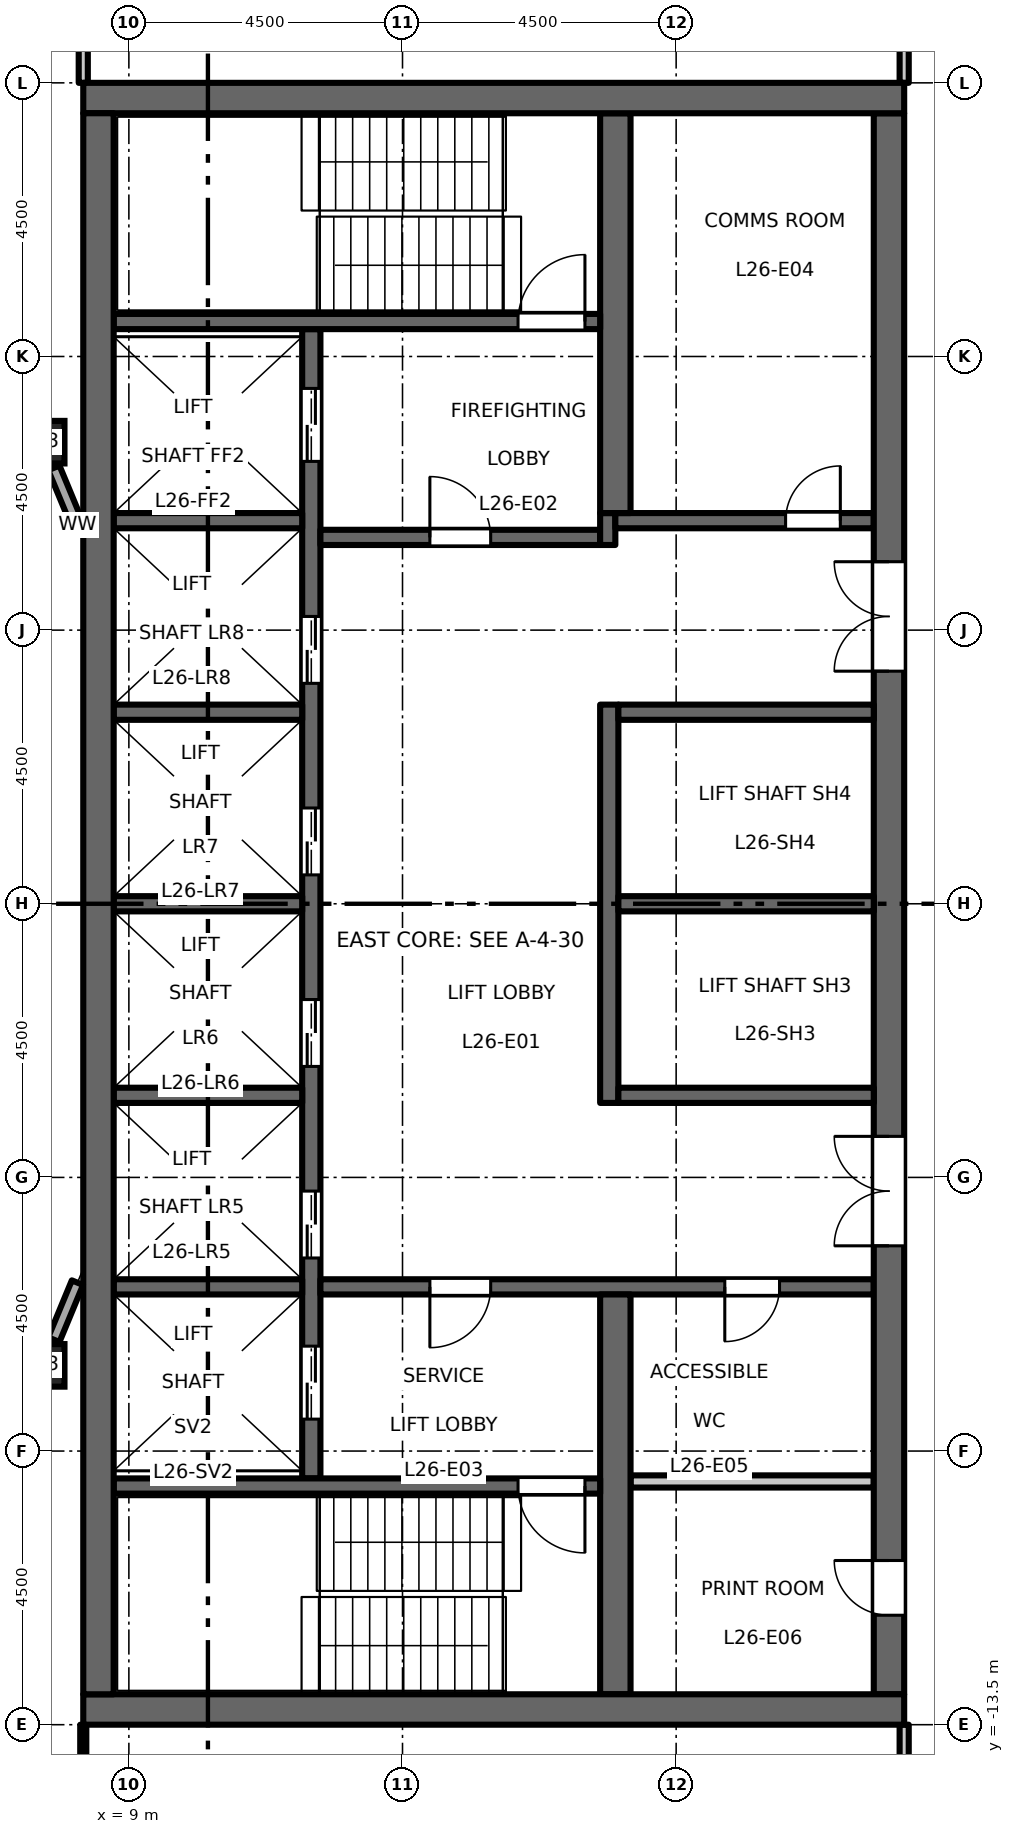
"""IFC4 building model, lengths in metres.
Left out: names, types, materials, properties, quantities, classifications, styles, units other than length and angle.
Written with IfcOpenShell. Run it as: python <this file> out.ifc"""

import sys

from ifc_helpers import new_model, si_unit, direction, frame, frame_2d, origin, origin_2d, place, context, subcontext, project, spatial, rectangle, hollow_rectangle, extrude, element, fill, save


model = new_model("IFC4")
c1 = context("Model", 3, precision=1e-05, world=origin(), true_north=direction((0.0, 1.0)))
c2 = subcontext(c1, "Body", "Model", "MODEL_VIEW")
j1 = project(units=[si_unit("LENGTHUNIT", "METRE"), si_unit("PLANEANGLEUNIT", "RADIAN")], contexts=[c1])
p1 = place(None, origin())
s1 = spatial("IfcSite", under=j1, at=p1, CompositionType="ELEMENT")
p2 = place(p1, origin())
s2 = spatial("IfcBuilding", under=s1, at=p2, CompositionType="ELEMENT")
p3 = place(p2, frame((0.0, 0.0, 122.7)))
s3 = spatial("IfcBuildingStorey", under=s2, at=p3, CompositionType="ELEMENT", Elevation=122.7)
for number, where, z_axis, x_axis in (
    (1, (7.591, -7.591, 0.0), (0.0, 0.0, 1.0), (1.0, 0.0, 0.0)),
    (2, (7.591, 7.591, 0.0), (0.0, 0.0, 1.0), (1.0, 0.0, 0.0)),
):
    element("IfcColumn", number, at=place(p3, frame(where, z_axis=z_axis, x_axis=x_axis)), inside=s3, PredefinedType="COLUMN", context=c2, shape_type="SweptSolid", body=[
        extrude(hollow_rectangle(XDim=0.7, YDim=0.7, WallThickness=0.04, at=origin_2d()), origin(), (0.0, 0.0, 1.0), 4.5),
    ])
p4 = place(p3, frame((12.0, -9.45, 0.0), z_axis=(0.0, 0.0, 1.0), x_axis=(0.0, 1.0, 0.0)))
e3 = element("IfcWall", 3, at=p4, inside=s3, PredefinedType="SHEAR", context=c2, shape_type="SweptSolid", body=[
    extrude(rectangle(XDim=18.9, YDim=0.3, at=frame_2d((9.45, 0.0))), origin(), (0.0, 0.0, 1.0), 4.35),
])
p5 = place(p4, frame((3.625, 0.0, 0.0)))
e4 = element("IfcOpeningElement", 4, at=p5, cuts=e3, PredefinedType="OPENING", context=c2, shape_type="SweptSolid", body=[
    extrude(rectangle(XDim=1.1, YDim=2.1, at=frame_2d((0.55, 1.05))), frame((0.0, 0.16, 0.0), z_axis=(0.0, -1.0, 0.0), x_axis=(1.0, 0.0, 0.0)), (0.0, 0.0, 1.0), 0.32),
])
p6 = place(p4, frame((6.775, 0.0, 0.0)))
e5 = element("IfcOpeningElement", 5, at=p6, cuts=e3, PredefinedType="OPENING", context=c2, shape_type="SweptSolid", body=[
    extrude(rectangle(XDim=1.1, YDim=2.1, at=frame_2d((0.55, 1.05))), frame((0.0, 0.16, 0.0), z_axis=(0.0, -1.0, 0.0), x_axis=(1.0, 0.0, 0.0)), (0.0, 0.0, 1.0), 0.32),
])
p7 = place(p4, frame((9.925, 0.0, 0.0)))
e6 = element("IfcOpeningElement", 6, at=p7, cuts=e3, PredefinedType="OPENING", context=c2, shape_type="SweptSolid", body=[
    extrude(rectangle(XDim=1.1, YDim=2.1, at=frame_2d((0.55, 1.05))), frame((0.0, 0.16, 0.0), z_axis=(0.0, -1.0, 0.0), x_axis=(1.0, 0.0, 0.0)), (0.0, 0.0, 1.0), 0.32),
])
p8 = place(p4, frame((13.075, 0.0, 0.0)))
e7 = element("IfcOpeningElement", 7, at=p8, cuts=e3, PredefinedType="OPENING", context=c2, shape_type="SweptSolid", body=[
    extrude(rectangle(XDim=1.1, YDim=2.1, at=frame_2d((0.55, 1.05))), frame((0.0, 0.16, 0.0), z_axis=(0.0, -1.0, 0.0), x_axis=(1.0, 0.0, 0.0)), (0.0, 0.0, 1.0), 0.32),
])
p9 = place(p4, frame((16.725, 0.0, 0.0)))
e8 = element("IfcOpeningElement", 8, at=p9, cuts=e3, PredefinedType="OPENING", context=c2, shape_type="SweptSolid", body=[
    extrude(rectangle(XDim=1.2, YDim=2.1, at=frame_2d((0.6, 1.05))), frame((0.0, 0.16, 0.0), z_axis=(0.0, -1.0, 0.0), x_axis=(1.0, 0.0, 0.0)), (0.0, 0.0, 1.0), 0.32),
])
p10 = place(p4, frame((0.975, 0.0, 0.0)))
e9 = element("IfcOpeningElement", 9, at=p10, cuts=e3, PredefinedType="OPENING", context=c2, shape_type="SweptSolid", body=[
    extrude(rectangle(XDim=1.2, YDim=2.1, at=frame_2d((0.6, 1.05))), frame((0.0, 0.16, 0.0), z_axis=(0.0, -1.0, 0.0), x_axis=(1.0, 0.0, 0.0)), (0.0, 0.0, 1.0), 0.32),
])
p11 = place(p3, frame((12.15, 6.025, 0.0), z_axis=(0.0, 0.0, 1.0), x_axis=(1.0, 0.0, 0.0)))
e10 = element("IfcWall", 10, at=p11, inside=s3, PredefinedType="SHEAR", context=c2, shape_type="SweptSolid", body=[
    extrude(rectangle(XDim=4.6, YDim=0.25, at=frame_2d((2.3, 0.0))), origin(), (0.0, 0.0, 1.0), 4.35),
])
p12 = place(p11, frame((1.8, 0.0, 0.0)))
e11 = element("IfcOpeningElement", 11, at=p12, cuts=e10, PredefinedType="OPENING", context=c2, shape_type="SweptSolid", body=[
    extrude(rectangle(XDim=1.0, YDim=2.1, at=frame_2d((0.5, 1.05))), frame((0.0, 0.135, 0.0), z_axis=(0.0, -1.0, 0.0), x_axis=(1.0, 0.0, 0.0)), (0.0, 0.0, 1.0), 0.27),
])
p13 = place(p3, frame((16.875, 5.9, 0.0), z_axis=(0.0, 0.0, 1.0), x_axis=(0.0, 1.0, 0.0)))
e12 = element("IfcWall", 12, at=p13, inside=s3, PredefinedType="SHEAR", context=c2, shape_type="SweptSolid", body=[
    extrude(rectangle(XDim=0.525, YDim=0.25, at=frame_2d((0.263, 0.0))), origin(), (0.0, 0.0, 1.0), 4.35),
])
p14 = place(p3, frame((17.0, 6.3, 0.0), z_axis=(0.0, 0.0, 1.0), x_axis=(1.0, 0.0, 0.0)))
e13 = element("IfcWall", 13, at=p14, inside=s3, PredefinedType="SHEAR", context=c2, shape_type="SweptSolid", body=[
    extrude(rectangle(XDim=4.25, YDim=0.25, at=frame_2d((2.125, 0.0))), origin(), (0.0, 0.0, 1.0), 4.35),
])
p15 = place(p14, frame((2.8, 0.0, 0.0)))
e14 = element("IfcOpeningElement", 14, at=p15, cuts=e13, PredefinedType="OPENING", context=c2, shape_type="SweptSolid", body=[
    extrude(rectangle(XDim=0.9, YDim=2.1, at=frame_2d((0.45, 1.05))), frame((0.0, 0.135, 0.0), z_axis=(0.0, -1.0, 0.0), x_axis=(1.0, 0.0, 0.0)), (0.0, 0.0, 1.0), 0.27),
])
p16 = place(p3, frame((12.15, -6.3, 0.0), z_axis=(0.0, 0.0, 1.0), x_axis=(1.0, 0.0, 0.0)))
e15 = element("IfcWall", 15, at=p16, inside=s3, PredefinedType="SHEAR", context=c2, shape_type="SweptSolid", body=[
    extrude(rectangle(XDim=9.1, YDim=0.25, at=frame_2d((4.55, 0.0))), origin(), (0.0, 0.0, 1.0), 4.35),
])
p17 = place(p16, frame((1.8, 0.0, 0.0)))
e16 = element("IfcOpeningElement", 16, at=p17, cuts=e15, PredefinedType="OPENING", context=c2, shape_type="SweptSolid", body=[
    extrude(rectangle(XDim=1.0, YDim=2.1, at=frame_2d((0.5, 1.05))), frame((0.0, 0.135, 0.0), z_axis=(0.0, -1.0, 0.0), x_axis=(1.0, 0.0, 0.0)), (0.0, 0.0, 1.0), 0.27),
])
p18 = place(p16, frame((6.65, 0.0, 0.0)))
e17 = element("IfcOpeningElement", 17, at=p18, cuts=e15, PredefinedType="OPENING", context=c2, shape_type="SweptSolid", body=[
    extrude(rectangle(XDim=0.9, YDim=2.1, at=frame_2d((0.45, 1.05))), frame((0.0, 0.135, 0.0), z_axis=(0.0, -1.0, 0.0), x_axis=(1.0, 0.0, 0.0)), (0.0, 0.0, 1.0), 0.27),
])
p19 = place(p3, frame((21.5, -13.0, 0.0), z_axis=(0.0, 0.0, 1.0), x_axis=(0.0, 1.0, 0.0)))
e18 = element("IfcWall", 18, at=p19, inside=s3, PredefinedType="SHEAR", context=c2, shape_type="SweptSolid", body=[
    extrude(rectangle(XDim=26.0, YDim=0.5, at=frame_2d((13.0, 0.0))), origin(), (0.0, 0.0, 1.0), 4.35),
])
p20 = place(p19, frame((16.825, 0.0, 0.0)))
e19 = element("IfcOpeningElement", 19, at=p20, cuts=e18, PredefinedType="OPENING", context=c2, shape_type="SweptSolid", body=[
    extrude(rectangle(XDim=1.8, YDim=2.1, at=frame_2d((0.9, 1.05))), frame((0.0, 0.26, 0.0), z_axis=(0.0, -1.0, 0.0), x_axis=(1.0, 0.0, 0.0)), (0.0, 0.0, 1.0), 0.52),
])
p21 = place(p19, frame((7.375, 0.0, 0.0)))
e20 = element("IfcOpeningElement", 20, at=p21, cuts=e18, PredefinedType="OPENING", context=c2, shape_type="SweptSolid", body=[
    extrude(rectangle(XDim=1.8, YDim=2.1, at=frame_2d((0.9, 1.05))), frame((0.0, 0.26, 0.0), z_axis=(0.0, -1.0, 0.0), x_axis=(1.0, 0.0, 0.0)), (0.0, 0.0, 1.0), 0.52),
])
p22 = place(p19, frame((1.3, 0.0, 0.0)))
e21 = element("IfcOpeningElement", 21, at=p22, cuts=e18, PredefinedType="OPENING", context=c2, shape_type="SweptSolid", body=[
    extrude(rectangle(XDim=0.9, YDim=2.1, at=frame_2d((0.45, 1.05))), frame((0.0, 0.26, 0.0), z_axis=(0.0, -1.0, 0.0), x_axis=(1.0, 0.0, 0.0)), (0.0, 0.0, 1.0), 0.52),
])
p23 = place(p3, frame((17.25, -9.5, 0.0), z_axis=(0.0, 0.0, 1.0), x_axis=(1.0, 0.0, 0.0)))
e22 = element("IfcWall", 22, at=p23, inside=s3, PredefinedType="PARTITIONING", context=c2, shape_type="SweptSolid", body=[
    extrude(rectangle(XDim=4.0, YDim=0.2, at=frame_2d((2.0, 0.0))), origin(), (0.0, 0.0, 1.0), 4.35),
])
p24 = place(p3, frame((16.9, -3.275, 0.0), z_axis=(0.0, 0.0, 1.0), x_axis=(0.0, 1.0, 0.0)))
e23 = element("IfcWall", 23, at=p24, inside=s3, PredefinedType="SHEAR", context=c2, shape_type="SweptSolid", body=[
    extrude(rectangle(XDim=6.55, YDim=0.3, at=frame_2d((3.275, 0.0))), origin(), (0.0, 0.0, 1.0), 4.35),
])
for number, where, z_axis, x_axis in (
    (24, (17.05, 0.0, 0.0), (0.0, 0.0, 1.0), (1.0, 0.0, 0.0)),
    (25, (17.05, 3.15, 0.0), (0.0, 0.0, 1.0), (1.0, 0.0, 0.0)),
    (26, (17.05, -3.15, 0.0), (0.0, 0.0, 1.0), (1.0, 0.0, 0.0)),
):
    element("IfcWall", number, at=place(p3, frame(where, z_axis=z_axis, x_axis=x_axis)), inside=s3, PredefinedType="SHEAR", context=c2, shape_type="SweptSolid", body=[
        extrude(rectangle(XDim=4.2, YDim=0.25, at=frame_2d((2.1, 0.0))), origin(), (0.0, 0.0, 1.0), 4.35),
    ])
for number, where, z_axis, x_axis in (
    (27, (17.0, 6.425, 0.0), (0.0, 0.0, 1.0), (0.0, 1.0, 0.0)),
    (28, (17.0, -13.0, 0.0), (0.0, 0.0, 1.0), (0.0, 1.0, 0.0)),
):
    element("IfcWall", number, at=place(p3, frame(where, z_axis=z_axis, x_axis=x_axis)), inside=s3, PredefinedType="SHEAR", context=c2, shape_type="SweptSolid", body=[
        extrude(rectangle(XDim=6.575, YDim=0.5, at=frame_2d((3.288, 0.0))), origin(), (0.0, 0.0, 1.0), 4.35),
    ])
for number, where, z_axis, x_axis in (
    (29, (8.75, 0.0, 0.0), (0.0, 0.0, 1.0), (1.0, 0.0, 0.0)),
    (30, (8.75, 3.15, 0.0), (0.0, 0.0, 1.0), (1.0, 0.0, 0.0)),
    (31, (8.75, 6.3, 0.0), (0.0, 0.0, 1.0), (1.0, 0.0, 0.0)),
    (32, (8.75, -3.15, 0.0), (0.0, 0.0, 1.0), (1.0, 0.0, 0.0)),
    (33, (8.75, -6.3, 0.0), (0.0, 0.0, 1.0), (1.0, 0.0, 0.0)),
):
    element("IfcWall", number, at=place(p3, frame(where, z_axis=z_axis, x_axis=x_axis)), inside=s3, PredefinedType="SHEAR", context=c2, shape_type="SweptSolid", body=[
        extrude(rectangle(XDim=3.1, YDim=0.25, at=frame_2d((1.55, 0.0))), origin(), (0.0, 0.0, 1.0), 4.35),
    ])
p25 = place(p3, frame((8.75, 9.575, 0.0), z_axis=(0.0, 0.0, 1.0), x_axis=(1.0, 0.0, 0.0)))
e34 = element("IfcWall", 34, at=p25, inside=s3, PredefinedType="SHEAR", context=c2, shape_type="SweptSolid", body=[
    extrude(rectangle(XDim=8.0, YDim=0.25, at=frame_2d((4.0, 0.0))), origin(), (0.0, 0.0, 1.0), 4.35),
])
p26 = place(p25, frame((6.65, 0.0, 0.0)))
e35 = element("IfcOpeningElement", 35, at=p26, cuts=e34, PredefinedType="OPENING", context=c2, shape_type="SweptSolid", body=[
    extrude(rectangle(XDim=1.1, YDim=2.1, at=frame_2d((0.55, 1.05))), frame((0.0, 0.135, 0.0), z_axis=(0.0, -1.0, 0.0), x_axis=(1.0, 0.0, 0.0)), (0.0, 0.0, 1.0), 0.27),
])
p27 = place(p3, frame((8.75, -9.575, 0.0), z_axis=(0.0, 0.0, 1.0), x_axis=(1.0, 0.0, 0.0)))
e36 = element("IfcWall", 36, at=p27, inside=s3, PredefinedType="SHEAR", context=c2, shape_type="SweptSolid", body=[
    extrude(rectangle(XDim=8.0, YDim=0.25, at=frame_2d((4.0, 0.0))), origin(), (0.0, 0.0, 1.0), 4.35),
])
p28 = place(p27, frame((6.65, 0.0, 0.0)))
e37 = element("IfcOpeningElement", 37, at=p28, cuts=e36, PredefinedType="OPENING", context=c2, shape_type="SweptSolid", body=[
    extrude(rectangle(XDim=1.1, YDim=2.1, at=frame_2d((0.55, 1.05))), frame((0.0, 0.135, 0.0), z_axis=(0.0, -1.0, 0.0), x_axis=(1.0, 0.0, 0.0)), (0.0, 0.0, 1.0), 0.27),
])
for number, where, z_axis, x_axis in (
    (38, (8.25, 13.25, 0.0), (0.0, 0.0, 1.0), (1.0, 0.0, 0.0)),
    (39, (8.25, -13.25, 0.0), (0.0, 0.0, 1.0), (1.0, 0.0, 0.0)),
):
    element("IfcWall", number, at=place(p3, frame(where, z_axis=z_axis, x_axis=x_axis)), inside=s3, PredefinedType="SHEAR", context=c2, shape_type="SweptSolid", body=[
        extrude(rectangle(XDim=13.5, YDim=0.5, at=frame_2d((6.75, 0.0))), origin(), (0.0, 0.0, 1.0), 4.35),
    ])
p29 = place(p3, frame((8.5, -13.0, 0.0), z_axis=(0.0, 0.0, 1.0), x_axis=(0.0, 1.0, 0.0)))
e40 = element("IfcWall", 40, at=p29, inside=s3, PredefinedType="SHEAR", context=c2, shape_type="SweptSolid", body=[
    extrude(rectangle(XDim=26.0, YDim=0.5, at=frame_2d((13.0, 0.0))), origin(), (0.0, 0.0, 1.0), 4.35),
])
for number, where, z_axis, x_axis in (
    (41, (7.766, -7.168, 0.0), (0.0, 0.0, 1.0), (0.383, 0.924, 0.0)),
    (42, (8.154, 6.231, 0.0), (0.0, 0.0, 1.0), (-0.383, 0.924, 0.0)),
):
    element("IfcWall", number, at=place(p3, frame(where, z_axis=z_axis, x_axis=x_axis)), inside=s3, PredefinedType="STANDARD", context=c2, shape_type="SweptSolid", body=[
        extrude(rectangle(XDim=1.015, YDim=0.2, at=frame_2d((0.507, 0.0))), origin(), (0.0, 0.0, 1.0), 3.826),
    ])
p30 = place(p3, frame((8.25, -17.925, 0.0), z_axis=(0.0, 0.0, 1.0), x_axis=(0.0, 1.0, 0.0)))
e43 = element("IfcWall", 43, at=p30, inside=s3, PredefinedType="PARTITIONING", context=c2, shape_type="SweptSolid", body=[
    extrude(rectangle(XDim=4.425, YDim=0.1, at=frame_2d((2.212, 0.0))), origin(), (0.0, 0.0, 1.0), 4.35),
])
p31 = place(p3, frame((8.25, 13.5, 0.0), z_axis=(0.0, 0.0, 1.0), x_axis=(0.0, 1.0, 0.0)))
e44 = element("IfcWall", 44, at=p31, inside=s3, PredefinedType="PARTITIONING", context=c2, shape_type="SweptSolid", body=[
    extrude(rectangle(XDim=2.3, YDim=0.15, at=frame_2d((1.15, 0.0))), origin(), (0.0, 0.0, 1.0), 4.35),
])
for number, where, z_axis, x_axis in (
    (45, (21.75, -17.925, 0.0), (0.0, 0.0, 1.0), (0.0, 1.0, 0.0)),
    (46, (21.75, 13.5, 0.0), (0.0, 0.0, 1.0), (0.0, 1.0, 0.0)),
):
    element("IfcWall", number, at=place(p3, frame(where, z_axis=z_axis, x_axis=x_axis)), inside=s3, PredefinedType="PARTITIONING", context=c2, shape_type="SweptSolid", body=[
        extrude(rectangle(XDim=4.425, YDim=0.15, at=frame_2d((2.212, 0.0))), origin(), (0.0, 0.0, 1.0), 4.35),
    ])
p32 = place(p12, origin())
e47 = element("IfcDoor", 47, at=p32, inside=s3, OperationType="SINGLE_SWING_RIGHT", PredefinedType="DOOR", context=c2, shape_type="SweptSolid", body=[
    extrude(rectangle(XDim=1.0, YDim=2.1, at=frame_2d((0.5, 1.05))), frame((0.0, 0.025, 0.0), z_axis=(0.0, -1.0, 0.0), x_axis=(1.0, 0.0, 0.0)), (0.0, 0.0, 1.0), 0.05),
])
fill(e11, e47)
p33 = place(p17, origin())
e48 = element("IfcDoor", 48, at=p33, inside=s3, OperationType="SINGLE_SWING_LEFT", PredefinedType="DOOR", context=c2, shape_type="SweptSolid", body=[
    extrude(rectangle(XDim=1.0, YDim=2.1, at=frame_2d((0.5, 1.05))), frame((0.0, 0.025, 0.0), z_axis=(0.0, -1.0, 0.0), x_axis=(1.0, 0.0, 0.0)), (0.0, 0.0, 1.0), 0.05),
])
fill(e16, e48)
p34 = place(p26, origin())
e49 = element("IfcDoor", 49, at=p34, inside=s3, OperationType="SINGLE_SWING_LEFT", PredefinedType="DOOR", context=c2, shape_type="SweptSolid", body=[
    extrude(rectangle(XDim=1.1, YDim=2.1, at=frame_2d((0.55, 1.05))), frame((0.0, 0.025, 0.0), z_axis=(0.0, -1.0, 0.0), x_axis=(1.0, 0.0, 0.0)), (0.0, 0.0, 1.0), 0.05),
])
fill(e35, e49)
p35 = place(p28, origin())
e50 = element("IfcDoor", 50, at=p35, inside=s3, OperationType="SINGLE_SWING_RIGHT", PredefinedType="DOOR", context=c2, shape_type="SweptSolid", body=[
    extrude(rectangle(XDim=1.1, YDim=2.1, at=frame_2d((0.55, 1.05))), frame((0.0, 0.025, 0.0), z_axis=(0.0, -1.0, 0.0), x_axis=(1.0, 0.0, 0.0)), (0.0, 0.0, 1.0), 0.05),
])
fill(e37, e50)
p36 = place(p20, origin())
e51 = element("IfcDoor", 51, at=p36, inside=s3, OperationType="DOUBLE_DOOR_DOUBLE_SWING", PredefinedType="DOOR", context=c2, shape_type="SweptSolid", body=[
    extrude(rectangle(XDim=1.8, YDim=2.1, at=frame_2d((0.9, 1.05))), frame((0.0, 0.025, 0.0), z_axis=(0.0, -1.0, 0.0), x_axis=(1.0, 0.0, 0.0)), (0.0, 0.0, 1.0), 0.05),
])
fill(e19, e51)
p37 = place(p21, origin())
e52 = element("IfcDoor", 52, at=p37, inside=s3, OperationType="DOUBLE_DOOR_DOUBLE_SWING", PredefinedType="DOOR", context=c2, shape_type="SweptSolid", body=[
    extrude(rectangle(XDim=1.8, YDim=2.1, at=frame_2d((0.9, 1.05))), frame((0.0, 0.025, 0.0), z_axis=(0.0, -1.0, 0.0), x_axis=(1.0, 0.0, 0.0)), (0.0, 0.0, 1.0), 0.05),
])
fill(e20, e52)
p38 = place(p5, origin())
e53 = element("IfcDoor", 53, at=p38, inside=s3, OperationType="DOUBLE_DOOR_SLIDING", PredefinedType="DOOR", context=c2, shape_type="SweptSolid", body=[
    extrude(rectangle(XDim=1.1, YDim=2.1, at=frame_2d((0.55, 1.05))), frame((0.0, 0.025, 0.0), z_axis=(0.0, -1.0, 0.0), x_axis=(1.0, 0.0, 0.0)), (0.0, 0.0, 1.0), 0.05),
])
fill(e4, e53)
p39 = place(p6, origin())
e54 = element("IfcDoor", 54, at=p39, inside=s3, OperationType="DOUBLE_DOOR_SLIDING", PredefinedType="DOOR", context=c2, shape_type="SweptSolid", body=[
    extrude(rectangle(XDim=1.1, YDim=2.1, at=frame_2d((0.55, 1.05))), frame((0.0, 0.025, 0.0), z_axis=(0.0, -1.0, 0.0), x_axis=(1.0, 0.0, 0.0)), (0.0, 0.0, 1.0), 0.05),
])
fill(e5, e54)
p40 = place(p7, origin())
e55 = element("IfcDoor", 55, at=p40, inside=s3, OperationType="DOUBLE_DOOR_SLIDING", PredefinedType="DOOR", context=c2, shape_type="SweptSolid", body=[
    extrude(rectangle(XDim=1.1, YDim=2.1, at=frame_2d((0.55, 1.05))), frame((0.0, 0.025, 0.0), z_axis=(0.0, -1.0, 0.0), x_axis=(1.0, 0.0, 0.0)), (0.0, 0.0, 1.0), 0.05),
])
fill(e6, e55)
p41 = place(p8, origin())
e56 = element("IfcDoor", 56, at=p41, inside=s3, OperationType="DOUBLE_DOOR_SLIDING", PredefinedType="DOOR", context=c2, shape_type="SweptSolid", body=[
    extrude(rectangle(XDim=1.1, YDim=2.1, at=frame_2d((0.55, 1.05))), frame((0.0, 0.025, 0.0), z_axis=(0.0, -1.0, 0.0), x_axis=(1.0, 0.0, 0.0)), (0.0, 0.0, 1.0), 0.05),
])
fill(e7, e56)
p42 = place(p9, origin())
e57 = element("IfcDoor", 57, at=p42, inside=s3, OperationType="DOUBLE_DOOR_SLIDING", PredefinedType="DOOR", context=c2, shape_type="SweptSolid", body=[
    extrude(rectangle(XDim=1.2, YDim=2.1, at=frame_2d((0.6, 1.05))), frame((0.0, 0.025, 0.0), z_axis=(0.0, -1.0, 0.0), x_axis=(1.0, 0.0, 0.0)), (0.0, 0.0, 1.0), 0.05),
])
fill(e8, e57)
p43 = place(p10, origin())
e58 = element("IfcDoor", 58, at=p43, inside=s3, OperationType="DOUBLE_DOOR_SLIDING", PredefinedType="DOOR", context=c2, shape_type="SweptSolid", body=[
    extrude(rectangle(XDim=1.2, YDim=2.1, at=frame_2d((0.6, 1.05))), frame((0.0, 0.025, 0.0), z_axis=(0.0, -1.0, 0.0), x_axis=(1.0, 0.0, 0.0)), (0.0, 0.0, 1.0), 0.05),
])
fill(e9, e58)
p44 = place(p15, origin())
e59 = element("IfcDoor", 59, at=p44, inside=s3, OperationType="SINGLE_SWING_LEFT", PredefinedType="DOOR", context=c2, shape_type="SweptSolid", body=[
    extrude(rectangle(XDim=0.9, YDim=2.1, at=frame_2d((0.45, 1.05))), frame((0.0, 0.025, 0.0), z_axis=(0.0, -1.0, 0.0), x_axis=(1.0, 0.0, 0.0)), (0.0, 0.0, 1.0), 0.05),
])
fill(e14, e59)
p45 = place(p18, origin())
e60 = element("IfcDoor", 60, at=p45, inside=s3, OperationType="SINGLE_SWING_LEFT", PredefinedType="DOOR", context=c2, shape_type="SweptSolid", body=[
    extrude(rectangle(XDim=0.9, YDim=2.1, at=frame_2d((0.45, 1.05))), frame((0.0, 0.025, 0.0), z_axis=(0.0, -1.0, 0.0), x_axis=(1.0, 0.0, 0.0)), (0.0, 0.0, 1.0), 0.05),
])
fill(e17, e60)
p46 = place(p22, origin())
e61 = element("IfcDoor", 61, at=p46, inside=s3, OperationType="SINGLE_SWING_LEFT", PredefinedType="DOOR", context=c2, shape_type="SweptSolid", body=[
    extrude(rectangle(XDim=0.9, YDim=2.1, at=frame_2d((0.45, 1.05))), frame((0.0, 0.025, 0.0), z_axis=(0.0, -1.0, 0.0), x_axis=(1.0, 0.0, 0.0)), (0.0, 0.0, 1.0), 0.05),
])
fill(e21, e61)
save(model, sys.argv[1])
